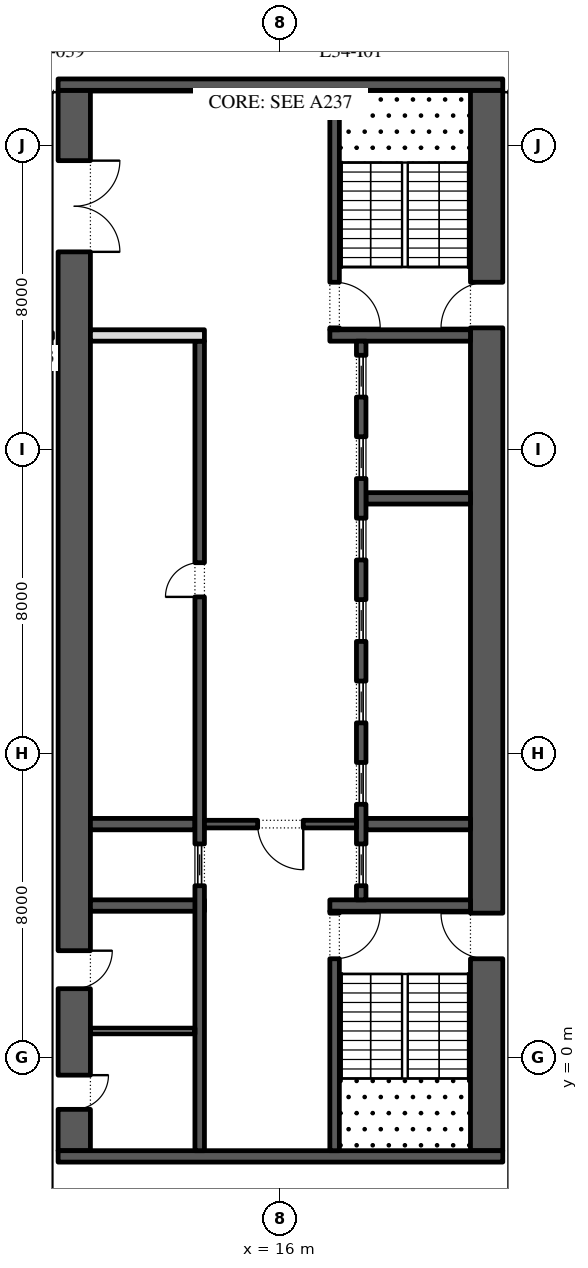
"""IFC4 building model, lengths in metres.
Left out: names, types, materials, properties, quantities, classifications, styles, units other than length and angle.
Written with IfcOpenShell. Run it as: python <this file> out.ifc"""

import sys

from ifc_helpers import new_model, si_unit, direction, frame, frame_2d, origin, place, context, subcontext, project, spatial, rectangle, extrude, element, fill, save


model = new_model("IFC4")
c1 = context("Model", 3, precision=1e-05, world=origin(), true_north=direction((0.0, 1.0)))
c2 = subcontext(c1, "Body", "Model", "MODEL_VIEW")
j1 = project(units=[si_unit("LENGTHUNIT", "METRE"), si_unit("PLANEANGLEUNIT", "RADIAN")], contexts=[c1])
p1 = place(None, origin())
s1 = spatial("IfcSite", under=j1, at=p1, CompositionType="ELEMENT")
p2 = place(p1, origin())
s2 = spatial("IfcBuilding", under=s1, at=p2, CompositionType="ELEMENT")
p3 = place(p2, frame((0.0, 0.0, 156.0)))
s3 = spatial("IfcBuildingStorey", under=s2, at=p3, CompositionType="ELEMENT", Elevation=156.0)
p4 = place(p3, frame((21.425, -2.45, 0.0), z_axis=(0.0, 0.0, 1.0), x_axis=(0.0, 1.0, 0.0)))
e1 = element("IfcWall", 1, at=p4, inside=s3, PredefinedType="SHEAR", context=c2, shape_type="SweptSolid", body=[
    extrude(rectangle(XDim=27.9, YDim=0.85, at=frame_2d((13.95, 0.0))), origin(), (0.0, 0.0, 1.0), 3.9),
])
p5 = place(p4, frame((5.05, 0.0, 0.0)))
e2 = element("IfcOpeningElement", 2, at=p5, cuts=e1, PredefinedType="OPENING", context=c2, shape_type="SweptSolid", body=[
    extrude(rectangle(XDim=1.2, YDim=2.1, at=frame_2d((0.6, 1.05))), frame((0.0, 0.435, 0.0), z_axis=(0.0, -1.0, 0.0), x_axis=(1.0, 0.0, 0.0)), (0.0, 0.0, 1.0), 0.87),
])
p6 = place(p4, frame((21.65, 0.0, 0.0)))
e3 = element("IfcOpeningElement", 3, at=p6, cuts=e1, PredefinedType="OPENING", context=c2, shape_type="SweptSolid", body=[
    extrude(rectangle(XDim=1.2, YDim=2.1, at=frame_2d((0.6, 1.05))), frame((0.0, 0.435, 0.0), z_axis=(0.0, -1.0, 0.0), x_axis=(1.0, 0.0, 0.0)), (0.0, 0.0, 1.0), 0.87),
])
p7 = place(p3, frame((10.575, -2.45, 0.0), z_axis=(0.0, 0.0, 1.0), x_axis=(0.0, 1.0, 0.0)))
e4 = element("IfcWall", 4, at=p7, inside=s3, PredefinedType="SHEAR", context=c2, shape_type="SweptSolid", body=[
    extrude(rectangle(XDim=27.9, YDim=0.85, at=frame_2d((13.95, 0.0))), origin(), (0.0, 0.0, 1.0), 3.9),
])
p8 = place(p7, frame((23.65, 0.0, 0.0)))
e5 = element("IfcOpeningElement", 5, at=p8, cuts=e4, PredefinedType="OPENING", context=c2, shape_type="SweptSolid", body=[
    extrude(rectangle(XDim=2.4, YDim=2.1, at=frame_2d((1.2, 1.05))), frame((0.0, 0.435, 0.0), z_axis=(0.0, -1.0, 0.0), x_axis=(1.0, 0.0, 0.0)), (0.0, 0.0, 1.0), 0.87),
])
p9 = place(p7, frame((1.087, 0.0, 0.0)))
e6 = element("IfcOpeningElement", 6, at=p9, cuts=e4, PredefinedType="OPENING", context=c2, shape_type="SweptSolid", body=[
    extrude(rectangle(XDim=0.9, YDim=2.1, at=frame_2d((0.45, 1.05))), frame((0.0, 0.435, 0.0), z_axis=(0.0, -1.0, 0.0), x_axis=(1.0, 0.0, 0.0)), (0.0, 0.0, 1.0), 0.87),
])
p10 = place(p7, frame((4.262, 0.0, 0.0)))
e7 = element("IfcOpeningElement", 7, at=p10, cuts=e4, PredefinedType="OPENING", context=c2, shape_type="SweptSolid", body=[
    extrude(rectangle(XDim=1.0, YDim=2.1, at=frame_2d((0.5, 1.05))), frame((0.0, 0.435, 0.0), z_axis=(0.0, -1.0, 0.0), x_axis=(1.0, 0.0, 0.0)), (0.0, 0.0, 1.0), 0.87),
])
for number, where, z_axis, x_axis in (
    (8, (10.15, -2.6, 0.0), (0.0, 0.0, 1.0), (1.0, 0.0, 0.0)),
    (9, (10.15, 25.6, 0.0), (0.0, 0.0, 1.0), (1.0, 0.0, 0.0)),
):
    element("IfcWall", number, at=place(p3, frame(where, z_axis=z_axis, x_axis=x_axis)), inside=s3, PredefinedType="SHEAR", context=c2, shape_type="SweptSolid", body=[
        extrude(rectangle(XDim=11.7, YDim=0.3, at=frame_2d((5.85, 0.0))), origin(), (0.0, 0.0, 1.0), 3.9),
    ])
p11 = place(p3, frame((17.3, 4.0, 0.0), z_axis=(0.0, 0.0, 1.0), x_axis=(1.0, 0.0, 0.0)))
e10 = element("IfcWall", 10, at=p11, inside=s3, PredefinedType="SHEAR", context=c2, shape_type="SweptSolid", body=[
    extrude(rectangle(XDim=3.7, YDim=0.3, at=frame_2d((1.85, 0.0))), origin(), (0.0, 0.0, 1.0), 3.9),
])
p12 = place(p3, frame((17.425, -2.45, 0.0), z_axis=(0.0, 0.0, 1.0), x_axis=(0.0, 1.0, 0.0)))
e11 = element("IfcWall", 11, at=p12, inside=s3, PredefinedType="SHEAR", context=c2, shape_type="SweptSolid", body=[
    extrude(rectangle(XDim=6.3, YDim=0.25, at=frame_2d((3.15, 0.0))), origin(), (0.0, 0.0, 1.0), 3.9),
])
p13 = place(p12, frame((5.05, 0.0, 0.0)))
e12 = element("IfcOpeningElement", 12, at=p13, cuts=e11, PredefinedType="OPENING", context=c2, shape_type="SweptSolid", body=[
    extrude(rectangle(XDim=1.2, YDim=2.1, at=frame_2d((0.6, 1.05))), frame((0.0, 0.135, 0.0), z_axis=(0.0, -1.0, 0.0), x_axis=(1.0, 0.0, 0.0)), (0.0, 0.0, 1.0), 0.27),
])
p14 = place(p3, frame((17.3, 19.0, 0.0), z_axis=(0.0, 0.0, 1.0), x_axis=(1.0, 0.0, 0.0)))
e13 = element("IfcWall", 13, at=p14, inside=s3, PredefinedType="SHEAR", context=c2, shape_type="SweptSolid", body=[
    extrude(rectangle(XDim=3.7, YDim=0.3, at=frame_2d((1.85, 0.0))), origin(), (0.0, 0.0, 1.0), 3.9),
])
p15 = place(p3, frame((17.425, 19.15, 0.0), z_axis=(0.0, 0.0, 1.0), x_axis=(0.0, 1.0, 0.0)))
e14 = element("IfcWall", 14, at=p15, inside=s3, PredefinedType="SHEAR", context=c2, shape_type="SweptSolid", body=[
    extrude(rectangle(XDim=6.3, YDim=0.25, at=frame_2d((3.15, 0.0))), origin(), (0.0, 0.0, 1.0), 3.9),
])
p16 = place(p15, frame((0.05, 0.0, 0.0)))
e15 = element("IfcOpeningElement", 15, at=p16, cuts=e14, PredefinedType="OPENING", context=c2, shape_type="SweptSolid", body=[
    extrude(rectangle(XDim=1.2, YDim=2.1, at=frame_2d((0.6, 1.05))), frame((0.0, 0.135, 0.0), z_axis=(0.0, -1.0, 0.0), x_axis=(1.0, 0.0, 0.0)), (0.0, 0.0, 1.0), 0.27),
])
for number, where, z_axis, x_axis in (
    (16, (18.25, 6.143, 0.0), (0.0, 0.0, 1.0), (1.0, 0.0, 0.0)),
    (17, (18.25, 14.714, 0.0), (0.0, 0.0, 1.0), (1.0, 0.0, 0.0)),
):
    element("IfcWall", number, at=place(p3, frame(where, z_axis=z_axis, x_axis=x_axis)), inside=s3, PredefinedType="SHEAR", context=c2, shape_type="SweptSolid", body=[
        extrude(rectangle(XDim=2.75, YDim=0.3, at=frame_2d((1.375, 0.0))), origin(), (0.0, 0.0, 1.0), 3.9),
    ])
p17 = place(p3, frame((18.125, 4.15, 0.0), z_axis=(0.0, 0.0, 1.0), x_axis=(0.0, 1.0, 0.0)))
e18 = element("IfcWall", 18, at=p17, inside=s3, PredefinedType="SHEAR", context=c2, shape_type="SweptSolid", body=[
    extrude(rectangle(XDim=14.7, YDim=0.25, at=frame_2d((7.35, 0.0))), origin(), (0.0, 0.0, 1.0), 3.9),
])
p18 = place(p17, frame((0.371, 0.0, 0.0)))
e19 = element("IfcOpeningElement", 19, at=p18, cuts=e18, PredefinedType="OPENING", context=c2, shape_type="SweptSolid", body=[
    extrude(rectangle(XDim=1.1, YDim=2.1, at=frame_2d((0.55, 1.05))), frame((0.0, 0.135, 0.0), z_axis=(0.0, -1.0, 0.0), x_axis=(1.0, 0.0, 0.0)), (0.0, 0.0, 1.0), 0.27),
])
p19 = place(p17, frame((2.514, 0.0, 0.0)))
e20 = element("IfcOpeningElement", 20, at=p19, cuts=e18, PredefinedType="OPENING", context=c2, shape_type="SweptSolid", body=[
    extrude(rectangle(XDim=1.1, YDim=2.1, at=frame_2d((0.55, 1.05))), frame((0.0, 0.135, 0.0), z_axis=(0.0, -1.0, 0.0), x_axis=(1.0, 0.0, 0.0)), (0.0, 0.0, 1.0), 0.27),
])
p20 = place(p17, frame((4.657, 0.0, 0.0)))
e21 = element("IfcOpeningElement", 21, at=p20, cuts=e18, PredefinedType="OPENING", context=c2, shape_type="SweptSolid", body=[
    extrude(rectangle(XDim=1.1, YDim=2.1, at=frame_2d((0.55, 1.05))), frame((0.0, 0.135, 0.0), z_axis=(0.0, -1.0, 0.0), x_axis=(1.0, 0.0, 0.0)), (0.0, 0.0, 1.0), 0.27),
])
p21 = place(p17, frame((6.8, 0.0, 0.0)))
e22 = element("IfcOpeningElement", 22, at=p21, cuts=e18, PredefinedType="OPENING", context=c2, shape_type="SweptSolid", body=[
    extrude(rectangle(XDim=1.1, YDim=2.1, at=frame_2d((0.55, 1.05))), frame((0.0, 0.135, 0.0), z_axis=(0.0, -1.0, 0.0), x_axis=(1.0, 0.0, 0.0)), (0.0, 0.0, 1.0), 0.27),
])
p22 = place(p17, frame((8.943, 0.0, 0.0)))
e23 = element("IfcOpeningElement", 23, at=p22, cuts=e18, PredefinedType="OPENING", context=c2, shape_type="SweptSolid", body=[
    extrude(rectangle(XDim=1.1, YDim=2.1, at=frame_2d((0.55, 1.05))), frame((0.0, 0.135, 0.0), z_axis=(0.0, -1.0, 0.0), x_axis=(1.0, 0.0, 0.0)), (0.0, 0.0, 1.0), 0.27),
])
p23 = place(p17, frame((11.086, 0.0, 0.0)))
e24 = element("IfcOpeningElement", 24, at=p23, cuts=e18, PredefinedType="OPENING", context=c2, shape_type="SweptSolid", body=[
    extrude(rectangle(XDim=1.1, YDim=2.1, at=frame_2d((0.55, 1.05))), frame((0.0, 0.135, 0.0), z_axis=(0.0, -1.0, 0.0), x_axis=(1.0, 0.0, 0.0)), (0.0, 0.0, 1.0), 0.27),
])
p24 = place(p17, frame((13.229, 0.0, 0.0)))
e25 = element("IfcOpeningElement", 25, at=p24, cuts=e18, PredefinedType="OPENING", context=c2, shape_type="SweptSolid", body=[
    extrude(rectangle(XDim=1.1, YDim=2.1, at=frame_2d((0.55, 1.05))), frame((0.0, 0.135, 0.0), z_axis=(0.0, -1.0, 0.0), x_axis=(1.0, 0.0, 0.0)), (0.0, 0.0, 1.0), 0.27),
])
p25 = place(p3, frame((11.0, 4.0, 0.0), z_axis=(0.0, 0.0, 1.0), x_axis=(1.0, 0.0, 0.0)))
e26 = element("IfcWall", 26, at=p25, inside=s3, PredefinedType="SHEAR", context=c2, shape_type="SweptSolid", body=[
    extrude(rectangle(XDim=3.0, YDim=0.3, at=frame_2d((1.5, 0.0))), origin(), (0.0, 0.0, 1.0), 3.9),
])
p26 = place(p3, frame((11.0, 6.143, 0.0), z_axis=(0.0, 0.0, 1.0), x_axis=(1.0, 0.0, 0.0)))
e27 = element("IfcWall", 27, at=p26, inside=s3, PredefinedType="SHEAR", context=c2, shape_type="SweptSolid", body=[
    extrude(rectangle(XDim=2.75, YDim=0.3, at=frame_2d((1.375, 0.0))), origin(), (0.0, 0.0, 1.0), 3.9),
])
p27 = place(p3, frame((13.875, -2.45, 0.0), z_axis=(0.0, 0.0, 1.0), x_axis=(0.0, 1.0, 0.0)))
e28 = element("IfcWall", 28, at=p27, inside=s3, PredefinedType="SHEAR", context=c2, shape_type="SweptSolid", body=[
    extrude(rectangle(XDim=21.3, YDim=0.25, at=frame_2d((10.65, 0.0))), origin(), (0.0, 0.0, 1.0), 3.9),
])
p28 = place(p27, frame((14.571, 0.0, 0.0)))
e29 = element("IfcOpeningElement", 29, at=p28, cuts=e28, PredefinedType="OPENING", context=c2, shape_type="SweptSolid", body=[
    extrude(rectangle(XDim=0.9, YDim=2.1, at=frame_2d((0.45, 1.05))), frame((0.0, 0.135, 0.0), z_axis=(0.0, -1.0, 0.0), x_axis=(1.0, 0.0, 0.0)), (0.0, 0.0, 1.0), 0.27),
])
p29 = place(p27, frame((6.971, 0.0, 0.0)))
e30 = element("IfcOpeningElement", 30, at=p29, cuts=e28, PredefinedType="OPENING", context=c2, shape_type="SweptSolid", body=[
    extrude(rectangle(XDim=1.1, YDim=2.1, at=frame_2d((0.55, 1.05))), frame((0.0, 0.135, 0.0), z_axis=(0.0, -1.0, 0.0), x_axis=(1.0, 0.0, 0.0)), (0.0, 0.0, 1.0), 0.27),
])
p30 = place(p3, frame((11.0, 19.0, 0.0), z_axis=(0.0, 0.0, 1.0), x_axis=(1.0, 0.0, 0.0)))
e31 = element("IfcWall", 31, at=p30, inside=s3, PredefinedType="PARTITIONING", context=c2, shape_type="SweptSolid", body=[
    extrude(rectangle(XDim=3.0, YDim=0.3, at=frame_2d((1.5, 0.0))), origin(), (0.0, 0.0, 1.0), 3.9),
])
p31 = place(p3, frame((14.0, 6.143, 0.0), z_axis=(0.0, 0.0, 1.0), x_axis=(1.0, 0.0, 0.0)))
e32 = element("IfcWall", 32, at=p31, inside=s3, PredefinedType="SHEAR", context=c2, shape_type="SweptSolid", body=[
    extrude(rectangle(XDim=4.0, YDim=0.2, at=frame_2d((2.0, 0.0))), origin(), (0.0, 0.0, 1.0), 3.9),
])
p32 = place(p31, frame((1.4, 0.0, 0.0)))
e33 = element("IfcOpeningElement", 33, at=p32, cuts=e32, PredefinedType="OPENING", context=c2, shape_type="SweptSolid", body=[
    extrude(rectangle(XDim=1.2, YDim=2.1, at=frame_2d((0.6, 1.05))), frame((0.0, 0.11, 0.0), z_axis=(0.0, -1.0, 0.0), x_axis=(1.0, 0.0, 0.0)), (0.0, 0.0, 1.0), 0.22),
])
p33 = place(p3, frame((11.0, 0.7, 0.0), z_axis=(0.0, 0.0, 1.0), x_axis=(1.0, 0.0, 0.0)))
e34 = element("IfcWall", 34, at=p33, inside=s3, PredefinedType="PARTITIONING", context=c2, shape_type="SweptSolid", body=[
    extrude(rectangle(XDim=2.75, YDim=0.15, at=frame_2d((1.375, 0.0))), origin(), (0.0, 0.0, 1.0), 3.9),
])
p34 = place(p18, origin())
e35 = element("IfcDoor", 35, at=p34, inside=s3, OperationType="SLIDING_TO_LEFT", PredefinedType="DOOR", context=c2, shape_type="SweptSolid", body=[
    extrude(rectangle(XDim=1.1, YDim=2.1, at=frame_2d((0.55, 1.05))), frame((0.0, 0.025, 0.0), z_axis=(0.0, -1.0, 0.0), x_axis=(1.0, 0.0, 0.0)), (0.0, 0.0, 1.0), 0.05),
])
fill(e19, e35)
p35 = place(p19, origin())
e36 = element("IfcDoor", 36, at=p35, inside=s3, OperationType="SLIDING_TO_LEFT", PredefinedType="DOOR", context=c2, shape_type="SweptSolid", body=[
    extrude(rectangle(XDim=1.1, YDim=2.1, at=frame_2d((0.55, 1.05))), frame((0.0, 0.025, 0.0), z_axis=(0.0, -1.0, 0.0), x_axis=(1.0, 0.0, 0.0)), (0.0, 0.0, 1.0), 0.05),
])
fill(e20, e36)
p36 = place(p20, origin())
e37 = element("IfcDoor", 37, at=p36, inside=s3, OperationType="SLIDING_TO_LEFT", PredefinedType="DOOR", context=c2, shape_type="SweptSolid", body=[
    extrude(rectangle(XDim=1.1, YDim=2.1, at=frame_2d((0.55, 1.05))), frame((0.0, 0.025, 0.0), z_axis=(0.0, -1.0, 0.0), x_axis=(1.0, 0.0, 0.0)), (0.0, 0.0, 1.0), 0.05),
])
fill(e21, e37)
p37 = place(p21, origin())
e38 = element("IfcDoor", 38, at=p37, inside=s3, OperationType="SLIDING_TO_LEFT", PredefinedType="DOOR", context=c2, shape_type="SweptSolid", body=[
    extrude(rectangle(XDim=1.1, YDim=2.1, at=frame_2d((0.55, 1.05))), frame((0.0, 0.025, 0.0), z_axis=(0.0, -1.0, 0.0), x_axis=(1.0, 0.0, 0.0)), (0.0, 0.0, 1.0), 0.05),
])
fill(e22, e38)
p38 = place(p22, origin())
e39 = element("IfcDoor", 39, at=p38, inside=s3, OperationType="SLIDING_TO_LEFT", PredefinedType="DOOR", context=c2, shape_type="SweptSolid", body=[
    extrude(rectangle(XDim=1.1, YDim=2.1, at=frame_2d((0.55, 1.05))), frame((0.0, 0.025, 0.0), z_axis=(0.0, -1.0, 0.0), x_axis=(1.0, 0.0, 0.0)), (0.0, 0.0, 1.0), 0.05),
])
fill(e23, e39)
p39 = place(p23, origin())
e40 = element("IfcDoor", 40, at=p39, inside=s3, OperationType="SLIDING_TO_LEFT", PredefinedType="DOOR", context=c2, shape_type="SweptSolid", body=[
    extrude(rectangle(XDim=1.1, YDim=2.1, at=frame_2d((0.55, 1.05))), frame((0.0, 0.025, 0.0), z_axis=(0.0, -1.0, 0.0), x_axis=(1.0, 0.0, 0.0)), (0.0, 0.0, 1.0), 0.05),
])
fill(e24, e40)
p40 = place(p24, origin())
e41 = element("IfcDoor", 41, at=p40, inside=s3, OperationType="SLIDING_TO_LEFT", PredefinedType="DOOR", context=c2, shape_type="SweptSolid", body=[
    extrude(rectangle(XDim=1.1, YDim=2.1, at=frame_2d((0.55, 1.05))), frame((0.0, 0.025, 0.0), z_axis=(0.0, -1.0, 0.0), x_axis=(1.0, 0.0, 0.0)), (0.0, 0.0, 1.0), 0.05),
])
fill(e25, e41)
p41 = place(p28, origin())
e42 = element("IfcDoor", 42, at=p41, inside=s3, OperationType="SINGLE_SWING_RIGHT", PredefinedType="DOOR", context=c2, shape_type="SweptSolid", body=[
    extrude(rectangle(XDim=0.9, YDim=2.1, at=frame_2d((0.45, 1.05))), frame((0.0, 0.125, 0.0), z_axis=(0.0, -1.0, 0.0), x_axis=(1.0, 0.0, 0.0)), (0.0, 0.0, 1.0), 0.05),
])
fill(e29, e42)
p42 = place(p29, origin())
e43 = element("IfcDoor", 43, at=p42, inside=s3, OperationType="SLIDING_TO_LEFT", PredefinedType="DOOR", context=c2, shape_type="SweptSolid", body=[
    extrude(rectangle(XDim=1.1, YDim=2.1, at=frame_2d((0.55, 1.05))), frame((0.0, 0.025, 0.0), z_axis=(0.0, -1.0, 0.0), x_axis=(1.0, 0.0, 0.0)), (0.0, 0.0, 1.0), 0.05),
])
fill(e30, e43)
p43 = place(p32, frame((1.2, 0.0, 0.0), z_axis=(0.0, 0.0, 1.0), x_axis=(-1.0, 0.0, 0.0)))
e44 = element("IfcDoor", 44, at=p43, inside=s3, OperationType="SINGLE_SWING_RIGHT", PredefinedType="DOOR", context=c2, shape_type="SweptSolid", body=[
    extrude(rectangle(XDim=1.2, YDim=2.1, at=frame_2d((0.6, 1.05))), frame((0.0, 0.025, 0.0), z_axis=(0.0, -1.0, 0.0), x_axis=(1.0, 0.0, 0.0)), (0.0, 0.0, 1.0), 0.05),
])
fill(e33, e44)
p44 = place(p8, frame((2.4, 0.0, 0.0), z_axis=(0.0, 0.0, 1.0), x_axis=(-1.0, 0.0, 0.0)))
e45 = element("IfcDoor", 45, at=p44, inside=s3, OperationType="DOUBLE_DOOR_SINGLE_SWING", PredefinedType="DOOR", context=c2, shape_type="SweptSolid", body=[
    extrude(rectangle(XDim=2.4, YDim=2.1, at=frame_2d((1.2, 1.05))), frame((0.0, 0.025, 0.0), z_axis=(0.0, -1.0, 0.0), x_axis=(1.0, 0.0, 0.0)), (0.0, 0.0, 1.0), 0.05),
])
fill(e5, e45)
p45 = place(p13, frame((1.2, 0.0, 0.0), z_axis=(0.0, 0.0, 1.0), x_axis=(-1.0, 0.0, 0.0)))
e46 = element("IfcDoor", 46, at=p45, inside=s3, OperationType="SINGLE_SWING_RIGHT", PredefinedType="DOOR", context=c2, shape_type="SweptSolid", body=[
    extrude(rectangle(XDim=1.2, YDim=2.1, at=frame_2d((0.6, 1.05))), frame((0.0, 0.025, 0.0), z_axis=(0.0, -1.0, 0.0), x_axis=(1.0, 0.0, 0.0)), (0.0, 0.0, 1.0), 0.05),
])
fill(e12, e46)
p46 = place(p5, origin())
e47 = element("IfcDoor", 47, at=p46, inside=s3, OperationType="SINGLE_SWING_LEFT", PredefinedType="DOOR", context=c2, shape_type="SweptSolid", body=[
    extrude(rectangle(XDim=1.2, YDim=2.1, at=frame_2d((0.6, 1.05))), frame((0.0, 0.025, 0.0), z_axis=(0.0, -1.0, 0.0), x_axis=(1.0, 0.0, 0.0)), (0.0, 0.0, 1.0), 0.05),
])
fill(e2, e47)
p47 = place(p16, frame((1.2, 0.0, 0.0), z_axis=(0.0, 0.0, 1.0), x_axis=(-1.0, 0.0, 0.0)))
e48 = element("IfcDoor", 48, at=p47, inside=s3, OperationType="SINGLE_SWING_LEFT", PredefinedType="DOOR", context=c2, shape_type="SweptSolid", body=[
    extrude(rectangle(XDim=1.2, YDim=2.1, at=frame_2d((0.6, 1.05))), frame((0.0, 0.025, 0.0), z_axis=(0.0, -1.0, 0.0), x_axis=(1.0, 0.0, 0.0)), (0.0, 0.0, 1.0), 0.05),
])
fill(e15, e48)
p48 = place(p6, origin())
e49 = element("IfcDoor", 49, at=p48, inside=s3, OperationType="SINGLE_SWING_RIGHT", PredefinedType="DOOR", context=c2, shape_type="SweptSolid", body=[
    extrude(rectangle(XDim=1.2, YDim=2.1, at=frame_2d((0.6, 1.05))), frame((0.0, 0.025, 0.0), z_axis=(0.0, -1.0, 0.0), x_axis=(1.0, 0.0, 0.0)), (0.0, 0.0, 1.0), 0.05),
])
fill(e3, e49)
p49 = place(p9, frame((0.9, -0.8, 0.0), z_axis=(0.0, 0.0, 1.0), x_axis=(-1.0, 0.0, 0.0)))
e50 = element("IfcDoor", 50, at=p49, inside=s3, OperationType="SINGLE_SWING_RIGHT", PredefinedType="DOOR", context=c2, shape_type="SweptSolid", body=[
    extrude(rectangle(XDim=0.9, YDim=2.1, at=frame_2d((0.45, 1.05))), frame((0.0, -0.375, 0.0), z_axis=(0.0, -1.0, 0.0), x_axis=(1.0, 0.0, 0.0)), (0.0, 0.0, 1.0), 0.05),
])
fill(e6, e50)
p50 = place(p10, frame((1.0, -0.8, 0.0), z_axis=(0.0, 0.0, 1.0), x_axis=(-1.0, 0.0, 0.0)))
e51 = element("IfcDoor", 51, at=p50, inside=s3, OperationType="SINGLE_SWING_RIGHT", PredefinedType="DOOR", context=c2, shape_type="SweptSolid", body=[
    extrude(rectangle(XDim=1.0, YDim=2.1, at=frame_2d((0.5, 1.05))), frame((0.0, -0.375, 0.0), z_axis=(0.0, -1.0, 0.0), x_axis=(1.0, 0.0, 0.0)), (0.0, 0.0, 1.0), 0.05),
])
fill(e7, e51)
save(model, sys.argv[1])
